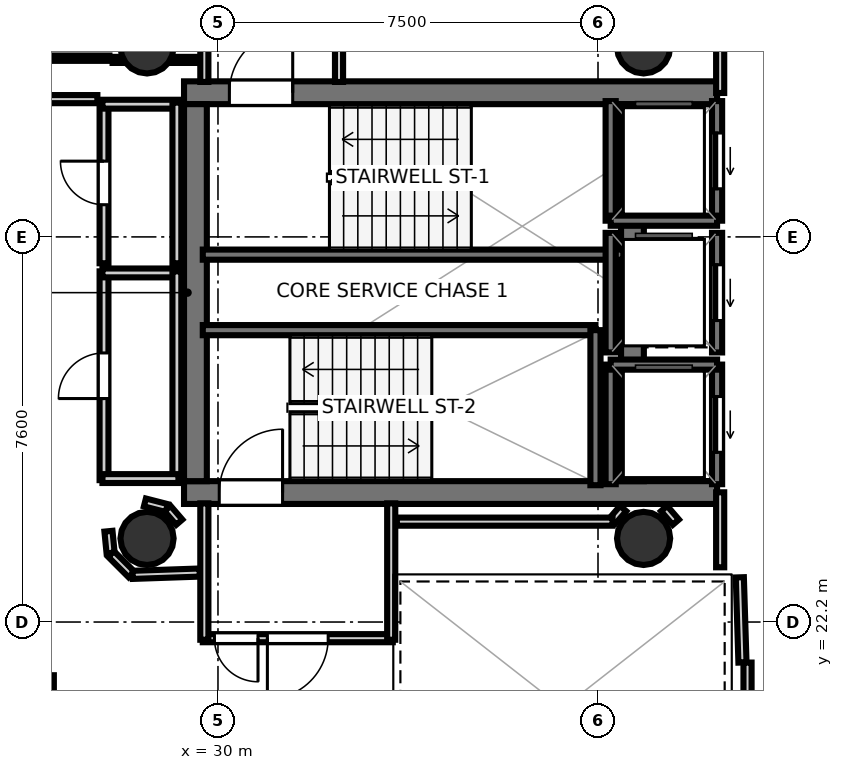
"""IFC4 building model, lengths in metres.
Left out: names, types, materials, properties, quantities, classifications, styles, units other than length and angle.
Written with IfcOpenShell. Run it as: python <this file> out.ifc"""

import sys

from ifc_helpers import new_model, si_unit, direction, frame, frame_2d, origin, origin_2d, place, context, subcontext, project, spatial, rectangle, hollow_circle, extrude, element, fill, save


model = new_model("IFC4")
c1 = context("Model", 3, precision=1e-05, world=origin(), true_north=direction((0.0, 1.0)))
c2 = subcontext(c1, "Body", "Model", "MODEL_VIEW")
j1 = project(units=[si_unit("LENGTHUNIT", "METRE"), si_unit("PLANEANGLEUNIT", "RADIAN")], contexts=[c1])
p1 = place(None, origin())
s1 = spatial("IfcSite", under=j1, at=p1, CompositionType="ELEMENT")
p2 = place(p1, origin())
s2 = spatial("IfcBuilding", under=s1, at=p2, CompositionType="ELEMENT")
p3 = place(p2, frame((0.0, 0.0, 250.1)))
s3 = spatial("IfcBuildingStorey", under=s2, at=p3, CompositionType="ELEMENT", Elevation=250.1)
p4 = place(p3, frame((29.33, 32.645, 0.0), z_axis=(0.0, 0.0, 1.0), x_axis=(1.0, 0.0, 0.0)))
e1 = element("IfcWall", 1, at=p4, inside=s3, PredefinedType="SHEAR", context=c2, shape_type="SweptSolid", body=[
    extrude(rectangle(XDim=10.52, YDim=0.45, at=frame_2d((5.26, 0.0))), origin(), (0.0, 0.0, 1.0), 3.52),
])
p5 = place(p4, frame((0.895, 0.0, 0.0)))
e2 = element("IfcOpeningElement", 2, at=p5, cuts=e1, PredefinedType="OPENING", context=c2, shape_type="SweptSolid", body=[
    extrude(rectangle(XDim=1.25, YDim=2.15, at=frame_2d((0.625, 1.075))), frame((0.0, 0.235, 0.0), z_axis=(0.0, -1.0, 0.0), x_axis=(1.0, 0.0, 0.0)), (0.0, 0.0, 1.0), 0.47),
])
p6 = place(p3, frame((29.33, 24.755, 0.0), z_axis=(0.0, 0.0, 1.0), x_axis=(1.0, 0.0, 0.0)))
e3 = element("IfcWall", 3, at=p6, inside=s3, PredefinedType="SHEAR", context=c2, shape_type="SweptSolid", body=[
    extrude(rectangle(XDim=10.52, YDim=0.45, at=frame_2d((5.26, 0.0))), origin(), (0.0, 0.0, 1.0), 3.52),
])
p7 = place(p6, frame((0.695, 0.0, 0.0)))
e4 = element("IfcOpeningElement", 4, at=p7, cuts=e3, PredefinedType="OPENING", context=c2, shape_type="SweptSolid", body=[
    extrude(rectangle(XDim=1.25, YDim=2.15, at=frame_2d((0.625, 1.075))), frame((0.0, 0.235, 0.0), z_axis=(0.0, -1.0, 0.0), x_axis=(1.0, 0.0, 0.0)), (0.0, 0.0, 1.0), 0.47),
])
for number, where, z_axis, x_axis in (
    (5, (29.555, 24.98, 0.0), (0.0, 0.0, 1.0), (0.0, 1.0, 0.0)),
    (6, (38.18, 24.98, 0.0), (0.0, 0.0, 1.0), (0.0, 1.0, 0.0)),
):
    element("IfcWall", number, at=place(p3, frame(where, z_axis=z_axis, x_axis=x_axis)), inside=s3, PredefinedType="SHEAR", context=c2, shape_type="SweptSolid", body=[
        extrude(rectangle(XDim=7.44, YDim=0.45, at=frame_2d((3.72, 0.0))), origin(), (0.0, 0.0, 1.0), 3.52),
    ])
for number, where, z_axis, x_axis in (
    (7, (28.6, 33.55, 0.0), (0.0, 0.0, 1.0), (1.0, 0.0, 0.0)),
    (8, (28.6, 23.85, 0.0), (0.0, 0.0, 1.0), (1.0, 0.0, 0.0)),
    (9, (38.4, 33.55, 0.0), (0.0, 0.0, 1.0), (1.0, 0.0, 0.0)),
    (10, (38.4, 23.85, 0.0), (0.0, 0.0, 1.0), (1.0, 0.0, 0.0)),
):
    element("IfcColumn", number, at=place(p3, frame(where, z_axis=z_axis, x_axis=x_axis)), inside=s3, PredefinedType="COLUMN", context=c2, shape_type="SweptSolid", body=[
        extrude(hollow_circle(Radius=0.525, WallThickness=0.028, at=origin_2d()), origin(), (0.0, 0.0, 1.0), 3.7),
    ])
p8 = place(p3, frame((29.7, 29.45, 0.0), z_axis=(0.0, 0.0, 1.0), x_axis=(1.0, 0.0, 0.0)))
e11 = element("IfcWall", 11, at=p8, inside=s3, PredefinedType="SOLIDWALL", context=c2, shape_type="SweptSolid", body=[
    extrude(rectangle(XDim=8.3, YDim=0.2, at=frame_2d((4.15, 0.0))), origin(), (0.0, 0.0, 1.0), 3.52),
])
p9 = place(p3, frame((29.7, 27.96, 0.0), z_axis=(0.0, 0.0, 1.0), x_axis=(1.0, 0.0, 0.0)))
e12 = element("IfcWall", 12, at=p9, inside=s3, PredefinedType="SOLIDWALL", context=c2, shape_type="SweptSolid", body=[
    extrude(rectangle(XDim=7.75, YDim=0.2, at=frame_2d((3.875, 0.0))), origin(), (0.0, 0.0, 1.0), 3.52),
])
p10 = place(p3, frame((37.45, 24.9, 0.0), z_axis=(0.0, 0.0, 1.0), x_axis=(0.0, 1.0, 0.0)))
e13 = element("IfcWall", 13, at=p10, inside=s3, PredefinedType="SOLIDWALL", context=c2, shape_type="SweptSolid", body=[
    extrude(rectangle(XDim=3.06, YDim=0.2, at=frame_2d((1.53, 0.0))), origin(), (0.0, 0.0, 1.0), 3.52),
])
p11 = place(p3, frame((39.85, 30.12, 0.0), z_axis=(0.0, 0.0, 1.0), x_axis=(0.0, 1.0, 0.0)))
e14 = element("IfcWall", 14, at=p11, inside=s3, PredefinedType="SOLIDWALL", context=c2, shape_type="SweptSolid", body=[
    extrude(rectangle(XDim=2.36, YDim=0.2, at=frame_2d((1.18, 0.0))), origin(), (0.0, 0.0, 1.0), 3.52),
])
p12 = place(p11, frame((0.63, 0.0, 0.0)))
e15 = element("IfcOpeningElement", 15, at=p12, cuts=e14, PredefinedType="OPENING", context=c2, shape_type="SweptSolid", body=[
    extrude(rectangle(XDim=1.1, YDim=2.15, at=frame_2d((0.55, 1.075))), frame((0.0, 0.11, 0.0), z_axis=(0.0, -1.0, 0.0), x_axis=(1.0, 0.0, 0.0)), (0.0, 0.0, 1.0), 0.22),
])
p13 = place(p3, frame((37.75, 30.12, 0.0), z_axis=(0.0, 0.0, 1.0), x_axis=(0.0, 1.0, 0.0)))
e16 = element("IfcWall", 16, at=p13, inside=s3, PredefinedType="SOLIDWALL", context=c2, shape_type="SweptSolid", body=[
    extrude(rectangle(XDim=2.36, YDim=0.2, at=frame_2d((1.18, 0.0))), origin(), (0.0, 0.0, 1.0), 3.52),
])
p14 = place(p3, frame((37.75, 30.12, 0.0), z_axis=(0.0, 0.0, 1.0), x_axis=(1.0, 0.0, 0.0)))
e17 = element("IfcWall", 17, at=p14, inside=s3, PredefinedType="SOLIDWALL", context=c2, shape_type="SweptSolid", body=[
    extrude(rectangle(XDim=2.1, YDim=0.2, at=frame_2d((1.05, 0.0))), origin(), (0.0, 0.0, 1.0), 3.52),
])
p15 = place(p3, frame((39.85, 24.92, 0.0), z_axis=(0.0, 0.0, 1.0), x_axis=(0.0, 1.0, 0.0)))
e18 = element("IfcWall", 18, at=p15, inside=s3, PredefinedType="SOLIDWALL", context=c2, shape_type="SweptSolid", body=[
    extrude(rectangle(XDim=2.36, YDim=0.2, at=frame_2d((1.18, 0.0))), origin(), (0.0, 0.0, 1.0), 3.52),
])
p16 = place(p15, frame((0.63, 0.0, 0.0)))
e19 = element("IfcOpeningElement", 19, at=p16, cuts=e18, PredefinedType="OPENING", context=c2, shape_type="SweptSolid", body=[
    extrude(rectangle(XDim=1.1, YDim=2.15, at=frame_2d((0.55, 1.075))), frame((0.0, 0.11, 0.0), z_axis=(0.0, -1.0, 0.0), x_axis=(1.0, 0.0, 0.0)), (0.0, 0.0, 1.0), 0.22),
])
p17 = place(p3, frame((37.75, 24.92, 0.0), z_axis=(0.0, 0.0, 1.0), x_axis=(0.0, 1.0, 0.0)))
e20 = element("IfcWall", 20, at=p17, inside=s3, PredefinedType="SOLIDWALL", context=c2, shape_type="SweptSolid", body=[
    extrude(rectangle(XDim=2.36, YDim=0.2, at=frame_2d((1.18, 0.0))), origin(), (0.0, 0.0, 1.0), 3.52),
])
p18 = place(p3, frame((37.75, 27.28, 0.0), z_axis=(0.0, 0.0, 1.0), x_axis=(1.0, 0.0, 0.0)))
e21 = element("IfcWall", 21, at=p18, inside=s3, PredefinedType="SOLIDWALL", context=c2, shape_type="SweptSolid", body=[
    extrude(rectangle(XDim=2.1, YDim=0.2, at=frame_2d((1.05, 0.0))), origin(), (0.0, 0.0, 1.0), 3.52),
])
p19 = place(p3, frame((39.85, 27.52, 0.0), z_axis=(0.0, 0.0, 1.0), x_axis=(0.0, 1.0, 0.0)))
e22 = element("IfcWall", 22, at=p19, inside=s3, PredefinedType="SOLIDWALL", context=c2, shape_type="SweptSolid", body=[
    extrude(rectangle(XDim=2.36, YDim=0.2, at=frame_2d((1.18, 0.0))), origin(), (0.0, 0.0, 1.0), 3.52),
])
p20 = place(p19, frame((0.63, 0.0, 0.0)))
e23 = element("IfcOpeningElement", 23, at=p20, cuts=e22, PredefinedType="OPENING", context=c2, shape_type="SweptSolid", body=[
    extrude(rectangle(XDim=1.1, YDim=2.15, at=frame_2d((0.55, 1.075))), frame((0.0, 0.11, 0.0), z_axis=(0.0, -1.0, 0.0), x_axis=(1.0, 0.0, 0.0)), (0.0, 0.0, 1.0), 0.22),
])
p21 = place(p3, frame((37.75, 27.52, 0.0), z_axis=(0.0, 0.0, 1.0), x_axis=(0.0, 1.0, 0.0)))
e24 = element("IfcWall", 24, at=p21, inside=s3, PredefinedType="SOLIDWALL", context=c2, shape_type="SweptSolid", body=[
    extrude(rectangle(XDim=2.36, YDim=0.2, at=frame_2d((1.18, 0.0))), origin(), (0.0, 0.0, 1.0), 3.52),
])
for number, where, z_axis, x_axis in (
    (25, (29.731, 32.858, 0.0), (0.0, 0.0, 1.0), (0.0, 1.0, 0.0)),
    (26, (32.389, 35.52, 0.0), (0.0, 0.0, 1.0), (0.0, -1.0, 0.0)),
):
    element("IfcWall", number, at=place(p3, frame(where, z_axis=z_axis, x_axis=x_axis)), inside=s3, PredefinedType="PARTITIONING", context=c2, shape_type="SweptSolid", body=[
        extrude(rectangle(XDim=2.662, YDim=0.16, at=frame_2d((1.331, 0.0))), origin(), (0.0, 0.0, 1.0), 2.84),
    ])
p22 = place(p3, frame((33.45, 21.881, 0.0), z_axis=(0.0, 0.0, 1.0), x_axis=(-1.0, 0.0, 0.0)))
e27 = element("IfcWall", 27, at=p22, inside=s3, PredefinedType="PARTITIONING", context=c2, shape_type="SweptSolid", body=[
    extrude(rectangle(XDim=3.75, YDim=0.16, at=frame_2d((1.875, 0.0))), origin(), (0.0, 0.0, 1.0), 2.84),
])
p23 = place(p22, frame((1.275, 0.0, 0.0)))
e28 = element("IfcOpeningElement", 28, at=p23, cuts=e27, PredefinedType="OPENING", context=c2, shape_type="SweptSolid", body=[
    extrude(rectangle(XDim=1.2, YDim=2.15, at=frame_2d((0.6, 1.075))), frame((0.0, 0.09, 0.0), z_axis=(0.0, -1.0, 0.0), x_axis=(1.0, 0.0, 0.0)), (0.0, 0.0, 1.0), 0.18),
])
p24 = place(p22, frame((2.66, 0.0, 0.0)))
e29 = element("IfcOpeningElement", 29, at=p24, cuts=e27, PredefinedType="OPENING", context=c2, shape_type="SweptSolid", body=[
    extrude(rectangle(XDim=0.86, YDim=2.05, at=frame_2d((0.43, 1.025))), frame((0.0, 0.09, 0.0), z_axis=(0.0, -1.0, 0.0), x_axis=(1.0, 0.0, 0.0)), (0.0, 0.0, 1.0), 0.18),
])
for number, where, z_axis, x_axis in (
    (30, (29.731, 21.85, 0.0), (0.0, 0.0, 1.0), (0.0, 1.0, 0.0)),
    (31, (33.419, 24.542, 0.0), (0.0, 0.0, 1.0), (0.0, -1.0, 0.0)),
):
    element("IfcWall", number, at=place(p3, frame(where, z_axis=z_axis, x_axis=x_axis)), inside=s3, PredefinedType="PARTITIONING", context=c2, shape_type="SweptSolid", body=[
        extrude(rectangle(XDim=2.692, YDim=0.16, at=frame_2d((1.346, 0.0))), origin(), (0.0, 0.0, 1.0), 2.84),
    ])
p25 = place(p3, frame((40.351, 21.401, 0.0), z_axis=(0.0, 0.0, 1.0), x_axis=(-0.031058045979, 0.999517582527, 0.0)))
e32 = element("IfcWall", 32, at=p25, inside=s3, PredefinedType="PARTITIONING", context=c2, shape_type="SweptSolid", body=[
    extrude(rectangle(XDim=1.682, YDim=0.16, at=frame_2d((0.841, 0.0))), origin(), (0.0, 0.0, 1.0), 2.84),
])
p26 = place(p3, frame((39.911, 23.28, 0.0), z_axis=(0.0, 0.0, 1.0), x_axis=(0.0, 1.0, 0.0)))
e33 = element("IfcWall", 33, at=p26, inside=s3, PredefinedType="PARTITIONING", context=c2, shape_type="SweptSolid", body=[
    extrude(rectangle(XDim=1.48, YDim=0.16, at=frame_2d((0.74, 0.0))), origin(), (0.0, 0.0, 1.0), 2.84),
])
p27 = place(p3, frame((39.911, 32.64, 0.0), z_axis=(0.0, 0.0, 1.0), x_axis=(0.0, 1.0, 0.0)))
e34 = element("IfcWall", 34, at=p27, inside=s3, PredefinedType="PARTITIONING", context=c2, shape_type="SweptSolid", body=[
    extrude(rectangle(XDim=2.88, YDim=0.16, at=frame_2d((1.44, 0.0))), origin(), (0.0, 0.0, 1.0), 2.84),
])
p28 = place(p3, frame((40.451, 18.08, 0.0), z_axis=(0.0, 0.0, 1.0), x_axis=(0.0, 1.0, 0.0)))
e35 = element("IfcWall", 35, at=p28, inside=s3, PredefinedType="PARTITIONING", context=c2, shape_type="SweptSolid", body=[
    extrude(rectangle(XDim=3.32, YDim=0.16, at=frame_2d((1.66, 0.0))), origin(), (0.0, 0.0, 1.0), 2.84),
])
p29 = place(p3, frame((27.751, 25.0, 0.0), z_axis=(0.0, 0.0, 1.0), x_axis=(0.0, 1.0, 0.0)))
e36 = element("IfcWall", 36, at=p29, inside=s3, PredefinedType="PLUMBINGWALL", context=c2, shape_type="SweptSolid", body=[
    extrude(rectangle(XDim=4.12, YDim=0.175, at=frame_2d((2.06, 0.0))), origin(), (0.0, 0.0, 1.0), 2.84),
])
p30 = place(p29, frame((1.61, 0.0, 0.0)))
e37 = element("IfcOpeningElement", 37, at=p30, cuts=e36, PredefinedType="OPENING", context=c2, shape_type="SweptSolid", body=[
    extrude(rectangle(XDim=0.9, YDim=2.1, at=frame_2d((0.45, 1.05))), frame((0.0, 0.097, 0.0), z_axis=(0.0, -1.0, 0.0), x_axis=(1.0, 0.0, 0.0)), (0.0, 0.0, 1.0), 0.195),
])
p31 = place(p3, frame((27.72, 29.089, 0.0), z_axis=(0.0, 0.0, 1.0), x_axis=(1.0, 0.0, 0.0)))
e38 = element("IfcWall", 38, at=p31, inside=s3, PredefinedType="PLUMBINGWALL", context=c2, shape_type="SweptSolid", body=[
    extrude(rectangle(XDim=1.5, YDim=0.175, at=frame_2d((0.75, 0.0))), origin(), (0.0, 0.0, 1.0), 2.84),
])
p32 = place(p3, frame((29.189, 29.12, 0.0), z_axis=(0.0, 0.0, 1.0), x_axis=(0.0, -1.0, 0.0)))
e39 = element("IfcWall", 39, at=p32, inside=s3, PredefinedType="PLUMBINGWALL", context=c2, shape_type="SweptSolid", body=[
    extrude(rectangle(XDim=4.12, YDim=0.175, at=frame_2d((2.06, 0.0))), origin(), (0.0, 0.0, 1.0), 2.84),
])
p33 = place(p3, frame((29.22, 25.031, 0.0), z_axis=(0.0, 0.0, 1.0), x_axis=(-1.0, 0.0, 0.0)))
e40 = element("IfcWall", 40, at=p33, inside=s3, PredefinedType="PLUMBINGWALL", context=c2, shape_type="SweptSolid", body=[
    extrude(rectangle(XDim=1.5, YDim=0.175, at=frame_2d((0.75, 0.0))), origin(), (0.0, 0.0, 1.0), 2.84),
])
p34 = place(p3, frame((27.751, 29.28, 0.0), z_axis=(0.0, 0.0, 1.0), x_axis=(0.0, 1.0, 0.0)))
e41 = element("IfcWall", 41, at=p34, inside=s3, PredefinedType="PLUMBINGWALL", context=c2, shape_type="SweptSolid", body=[
    extrude(rectangle(XDim=3.17, YDim=0.175, at=frame_2d((1.585, 0.0))), origin(), (0.0, 0.0, 1.0), 2.84),
])
p35 = place(p34, frame((1.155, 0.0, 0.0)))
e42 = element("IfcOpeningElement", 42, at=p35, cuts=e41, PredefinedType="OPENING", context=c2, shape_type="SweptSolid", body=[
    extrude(rectangle(XDim=0.86, YDim=2.05, at=frame_2d((0.43, 1.025))), frame((0.0, 0.097, 0.0), z_axis=(0.0, -1.0, 0.0), x_axis=(1.0, 0.0, 0.0)), (0.0, 0.0, 1.0), 0.195),
])
p36 = place(p3, frame((27.72, 32.419, 0.0), z_axis=(0.0, 0.0, 1.0), x_axis=(1.0, 0.0, 0.0)))
e43 = element("IfcWall", 43, at=p36, inside=s3, PredefinedType="PLUMBINGWALL", context=c2, shape_type="SweptSolid", body=[
    extrude(rectangle(XDim=1.5, YDim=0.175, at=frame_2d((0.75, 0.0))), origin(), (0.0, 0.0, 1.0), 2.84),
])
p37 = place(p3, frame((29.189, 32.45, 0.0), z_axis=(0.0, 0.0, 1.0), x_axis=(0.0, -1.0, 0.0)))
e44 = element("IfcWall", 44, at=p37, inside=s3, PredefinedType="PLUMBINGWALL", context=c2, shape_type="SweptSolid", body=[
    extrude(rectangle(XDim=3.17, YDim=0.175, at=frame_2d((1.585, 0.0))), origin(), (0.0, 0.0, 1.0), 2.84),
])
p38 = place(p3, frame((29.236, 24.17, 0.0), z_axis=(0.0, 0.0, 1.0), x_axis=(-0.652260263346, 0.757995084984, 0.0)))
e45 = element("IfcWall", 45, at=p38, inside=s3, PredefinedType="PARTITIONING", context=c2, shape_type="SweptSolid", body=[
    extrude(rectangle(XDim=0.355, YDim=0.16, at=frame_2d((0.178, 0.0))), origin(), (0.0, 0.0, 1.0), 2.84),
])
p39 = place(p3, frame((28.988, 24.45, 0.0), z_axis=(0.0, 0.0, 1.0), x_axis=(-0.968704505916, 0.248216800836, 0.0)))
e46 = element("IfcWall", 46, at=p39, inside=s3, PredefinedType="PARTITIONING", context=c2, shape_type="SweptSolid", body=[
    extrude(rectangle(XDim=0.445, YDim=0.16, at=frame_2d((0.222, 0.0))), origin(), (0.0, 0.0, 1.0), 2.84),
])
p40 = place(p3, frame((39.036, 24.17, 0.0), z_axis=(0.0, 0.0, 1.0), x_axis=(-0.652260263346, 0.757995084984, 0.0)))
e47 = element("IfcWall", 47, at=p40, inside=s3, PredefinedType="PARTITIONING", context=c2, shape_type="SweptSolid", body=[
    extrude(rectangle(XDim=0.355, YDim=0.16, at=frame_2d((0.178, 0.0))), origin(), (0.0, 0.0, 1.0), 2.84),
])
p41 = place(p3, frame((37.996, 24.44, 0.0), z_axis=(0.0, 0.0, 1.0), x_axis=(-0.652425645794, -0.757852740782, 0.0)))
e48 = element("IfcWall", 48, at=p41, inside=s3, PredefinedType="PARTITIONING", context=c2, shape_type="SweptSolid", body=[
    extrude(rectangle(XDim=0.32, YDim=0.16, at=frame_2d((0.16, 0.0))), origin(), (0.0, 0.0, 1.0), 2.84),
])
p42 = place(p3, frame((37.787, 24.181, 0.0), z_axis=(0.0, 0.0, 1.0), x_axis=(-1.0, 0.0, 0.0)))
e49 = element("IfcWall", 49, at=p42, inside=s3, PredefinedType="PARTITIONING", context=c2, shape_type="SweptSolid", body=[
    extrude(rectangle(XDim=4.257, YDim=0.16, at=frame_2d((2.129, 0.0))), origin(), (0.0, 0.0, 1.0), 2.84),
])
p43 = place(p3, frame((27.838, 23.992, 0.0), z_axis=(0.0, 0.0, 1.0), x_axis=(0.098273407977, -0.995159453196, 0.0)))
e50 = element("IfcWall", 50, at=p43, inside=s3, PredefinedType="PARTITIONING", context=c2, shape_type="SweptSolid", body=[
    extrude(rectangle(XDim=0.432, YDim=0.16, at=frame_2d((0.216, 0.0))), origin(), (0.0, 0.0, 1.0), 2.84),
])
p44 = place(p3, frame((27.89, 23.543, 0.0), z_axis=(0.0, 0.0, 1.0), x_axis=(0.707106781187, -0.707106781187, 0.0)))
e51 = element("IfcWall", 51, at=p44, inside=s3, PredefinedType="PARTITIONING", context=c2, shape_type="SweptSolid", body=[
    extrude(rectangle(XDim=0.57, YDim=0.16, at=frame_2d((0.285, 0.0))), origin(), (0.0, 0.0, 1.0), 2.84),
])
p45 = place(p3, frame((28.316, 23.131, 0.0), z_axis=(0.0, 0.0, 1.0), x_axis=(0.999405342193, 0.034481328227, 0.0)))
e52 = element("IfcWall", 52, at=p45, inside=s3, PredefinedType="PARTITIONING", context=c2, shape_type="SweptSolid", body=[
    extrude(rectangle(XDim=1.324, YDim=0.16, at=frame_2d((0.662, 0.0))), origin(), (0.0, 0.0, 1.0), 2.84),
])
p46 = place(p3, frame((26.681, 17.95, 0.0), z_axis=(0.0, 0.0, 1.0), x_axis=(0.0, 1.0, 0.0)))
e53 = element("IfcWall", 53, at=p46, inside=s3, PredefinedType="PARTITIONING", context=c2, shape_type="SweptSolid", body=[
    extrude(rectangle(XDim=3.2, YDim=0.16, at=frame_2d((1.6, 0.0))), origin(), (0.0, 0.0, 1.0), 2.84),
])
p47 = place(p3, frame((25.25, 32.519, 0.0), z_axis=(0.0, 0.0, 1.0), x_axis=(1.0, 0.0, 0.0)))
e54 = element("IfcWall", 54, at=p47, inside=s3, PredefinedType="PARTITIONING", context=c2, shape_type="SweptSolid", body=[
    extrude(rectangle(XDim=2.37, YDim=0.16, at=frame_2d((1.185, 0.0))), origin(), (0.0, 0.0, 1.0), 2.84),
])
p48 = place(p3, frame((19.323, 33.327, 0.0), z_axis=(0.0, 0.0, 1.0), x_axis=(1.0, 0.0, 0.0)))
e55 = element("IfcWall", 55, at=p48, inside=s3, PredefinedType="PARTITIONING", context=c2, shape_type="SweptSolid", body=[
    extrude(rectangle(XDim=8.534, YDim=0.105, at=frame_2d((4.267, 0.0))), origin(), (0.0, 0.0, 1.0), 2.84),
])
p49 = place(p3, frame((29.62, 33.293, 0.0), z_axis=(0.0, 0.0, 1.0), x_axis=(-1.0, 0.0, 0.0)))
e56 = element("IfcWall", 56, at=p49, inside=s3, PredefinedType="PARTITIONING", context=c2, shape_type="SweptSolid", body=[
    extrude(rectangle(XDim=1.7, YDim=0.12, at=frame_2d((0.85, 0.0))), origin(), (0.0, 0.0, 1.0), 2.84),
])
p50 = place(p5, origin())
e57 = element("IfcDoor", 57, at=p50, inside=s3, OperationType="SINGLE_SWING_RIGHT", PredefinedType="DOOR", context=c2, shape_type="SweptSolid", body=[
    extrude(rectangle(XDim=1.25, YDim=2.15, at=frame_2d((0.625, 1.075))), frame((0.0, 0.025, 0.0), z_axis=(0.0, -1.0, 0.0), x_axis=(1.0, 0.0, 0.0)), (0.0, 0.0, 1.0), 0.05),
])
fill(e2, e57)
p51 = place(p7, origin())
e58 = element("IfcDoor", 58, at=p51, inside=s3, OperationType="SINGLE_SWING_RIGHT", PredefinedType="DOOR", context=c2, shape_type="SweptSolid", body=[
    extrude(rectangle(XDim=1.25, YDim=2.15, at=frame_2d((0.625, 1.075))), frame((0.0, 0.025, 0.0), z_axis=(0.0, -1.0, 0.0), x_axis=(1.0, 0.0, 0.0)), (0.0, 0.0, 1.0), 0.05),
])
fill(e4, e58)
p52 = place(p12, origin())
e59 = element("IfcDoor", 59, at=p52, inside=s3, OperationType="SLIDING_TO_LEFT", PredefinedType="DOOR", context=c2, shape_type="SweptSolid", body=[
    extrude(rectangle(XDim=1.1, YDim=2.15, at=frame_2d((0.55, 1.075))), frame((0.0, 0.025, 0.0), z_axis=(0.0, -1.0, 0.0), x_axis=(1.0, 0.0, 0.0)), (0.0, 0.0, 1.0), 0.05),
])
fill(e15, e59)
p53 = place(p16, origin())
e60 = element("IfcDoor", 60, at=p53, inside=s3, OperationType="SLIDING_TO_LEFT", PredefinedType="DOOR", context=c2, shape_type="SweptSolid", body=[
    extrude(rectangle(XDim=1.1, YDim=2.15, at=frame_2d((0.55, 1.075))), frame((0.0, 0.025, 0.0), z_axis=(0.0, -1.0, 0.0), x_axis=(1.0, 0.0, 0.0)), (0.0, 0.0, 1.0), 0.05),
])
fill(e19, e60)
p54 = place(p20, origin())
e61 = element("IfcDoor", 61, at=p54, inside=s3, OperationType="SLIDING_TO_LEFT", PredefinedType="DOOR", context=c2, shape_type="SweptSolid", body=[
    extrude(rectangle(XDim=1.1, YDim=2.15, at=frame_2d((0.55, 1.075))), frame((0.0, 0.025, 0.0), z_axis=(0.0, -1.0, 0.0), x_axis=(1.0, 0.0, 0.0)), (0.0, 0.0, 1.0), 0.05),
])
fill(e23, e61)
p55 = place(p23, origin())
e62 = element("IfcDoor", 62, at=p55, inside=s3, OperationType="SINGLE_SWING_RIGHT", PredefinedType="DOOR", context=c2, shape_type="SweptSolid", body=[
    extrude(rectangle(XDim=1.2, YDim=2.15, at=frame_2d((0.6, 1.075))), frame((0.0, 0.025, 0.0), z_axis=(0.0, -1.0, 0.0), x_axis=(1.0, 0.0, 0.0)), (0.0, 0.0, 1.0), 0.05),
])
fill(e28, e62)
p56 = place(p30, origin())
e63 = element("IfcDoor", 63, at=p56, inside=s3, OperationType="SINGLE_SWING_LEFT", PredefinedType="DOOR", context=c2, shape_type="SweptSolid", body=[
    extrude(rectangle(XDim=0.9, YDim=2.1, at=frame_2d((0.45, 1.05))), frame((0.0, 0.025, 0.0), z_axis=(0.0, -1.0, 0.0), x_axis=(1.0, 0.0, 0.0)), (0.0, 0.0, 1.0), 0.05),
])
fill(e37, e63)
p57 = place(p35, origin())
e64 = element("IfcDoor", 64, at=p57, inside=s3, OperationType="SINGLE_SWING_RIGHT", PredefinedType="DOOR", context=c2, shape_type="SweptSolid", body=[
    extrude(rectangle(XDim=0.86, YDim=2.05, at=frame_2d((0.43, 1.025))), frame((0.0, 0.025, 0.0), z_axis=(0.0, -1.0, 0.0), x_axis=(1.0, 0.0, 0.0)), (0.0, 0.0, 1.0), 0.05),
])
fill(e42, e64)
p58 = place(p24, origin())
e65 = element("IfcDoor", 65, at=p58, inside=s3, OperationType="SINGLE_SWING_LEFT", PredefinedType="DOOR", context=c2, shape_type="SweptSolid", body=[
    extrude(rectangle(XDim=0.86, YDim=2.05, at=frame_2d((0.43, 1.025))), frame((0.0, 0.025, 0.0), z_axis=(0.0, -1.0, 0.0), x_axis=(1.0, 0.0, 0.0)), (0.0, 0.0, 1.0), 0.05),
])
fill(e29, e65)
save(model, sys.argv[1])
